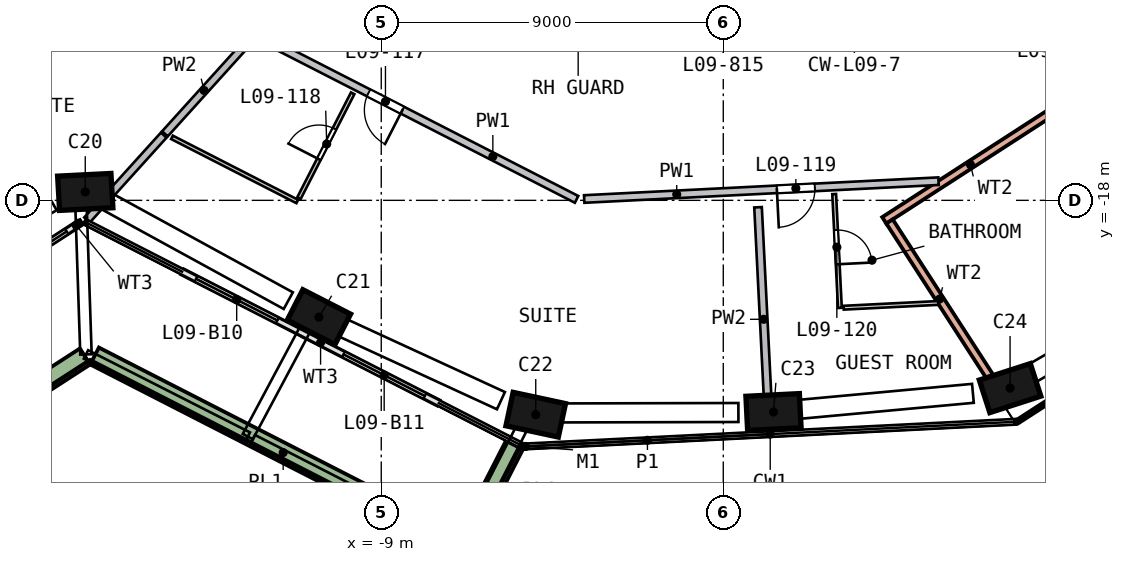
"""IFC4 building model, lengths in metres.
Left out: names, types, materials, properties, quantities, classifications, styles, units other than length and angle.
Written with IfcOpenShell. Run it as: python <this file> out.ifc"""

import sys

from ifc_helpers import new_model, si_unit, direction, frame, frame_2d, origin, origin_2d, place, context, subcontext, project, spatial, rectangle, extrude, element, fill, save


model = new_model("IFC4")
c1 = context("Model", 3, precision=1e-05, world=origin(), true_north=direction((0.0, 1.0)))
c2 = subcontext(c1, "Body", "Model", "MODEL_VIEW")
j1 = project(units=[si_unit("LENGTHUNIT", "METRE"), si_unit("PLANEANGLEUNIT", "RADIAN")], contexts=[c1])
p1 = place(None, origin())
s1 = spatial("IfcSite", under=j1, at=p1, CompositionType="ELEMENT")
p2 = place(p1, origin())
s2 = spatial("IfcBuilding", under=s1, at=p2, CompositionType="ELEMENT")
p3 = place(p2, frame((0.0, 0.0, 46.0)))
s3 = spatial("IfcBuildingStorey", under=s2, at=p3, CompositionType="ELEMENT", Elevation=46.0)
p4 = place(p3, frame((-16.891, -17.683, 0.0), z_axis=(0.084757235, -0.079588184, 0.993217968), x_axis=(-0.995133866, -0.057029138, 0.080350892)))
e1 = element("IfcColumn", 1, at=p4, inside=s3, PredefinedType="COLUMN", context=c2, shape_type="SweptSolid", body=[
    extrude(rectangle(XDim=1.4, YDim=0.9, at=origin_2d()), origin(), (0.0, 0.0, 1.0), 3.212),
])
p5 = place(p3, frame((-10.762, -21.013, 0.0), z_axis=(0.100386469, -0.050345335, 0.993673943), x_axis=(0.884418594, -0.452981845, -0.112299596)))
e2 = element("IfcColumn", 2, at=p5, inside=s3, PredefinedType="COLUMN", context=c2, shape_type="SweptSolid", body=[
    extrude(rectangle(XDim=1.4, YDim=0.9, at=origin_2d()), origin(), (0.0, 0.0, 1.0), 3.21),
])
p6 = place(p3, frame((-5.071, -23.613, 0.0), z_axis=(0.112446021, -0.023188666, 0.993387225), x_axis=(-0.971177217, 0.208887358, 0.114808032)))
e3 = element("IfcColumn", 3, at=p6, inside=s3, PredefinedType="COLUMN", context=c2, shape_type="SweptSolid", body=[
    extrude(rectangle(XDim=1.4, YDim=0.9, at=origin_2d()), origin(), (0.0, 0.0, 1.0), 3.211),
])
p7 = place(p3, frame((1.186, -23.579, 0.0), z_axis=(0.112098353, 0.006616389, 0.993675089), x_axis=(0.992410287, 0.050128839, -0.112289451)))
e4 = element("IfcColumn", 4, at=p7, inside=s3, PredefinedType="COLUMN", context=c2, shape_type="SweptSolid", body=[
    extrude(rectangle(XDim=1.4, YDim=0.9, at=origin_2d()), origin(), (0.0, 0.0, 1.0), 3.21),
])
p8 = place(p3, frame((7.415, -22.985, 0.0), z_axis=(0.109023965, 0.036189266, 0.993380145), x_axis=(-0.945420162, -0.304935678, 0.114869271)))
e5 = element("IfcColumn", 5, at=p8, inside=s3, PredefinedType="COLUMN", context=c2, shape_type="SweptSolid", body=[
    extrude(rectangle(XDim=1.4, YDim=0.9, at=origin_2d()), origin(), (0.0, 0.0, 1.0), 3.211),
])
p9 = place(p3, frame((-18.875, -19.852, 0.0), z_axis=(0.0, 0.0, 1.0), x_axis=(0.839837754, 0.542837496, 0.0)))
e6 = element("IfcWall", 6, at=p9, inside=s3, PredefinedType="SOLIDWALL", context=c2, shape_type="SweptSolid", body=[
    extrude(rectangle(XDim=2.3, YDim=0.15, at=frame_2d((1.15, 0.0))), origin(), (0.0, 0.0, 1.0), 2.425),
])
p10 = place(p9, frame((0.4, 0.0, 0.0)))
e7 = element("IfcOpeningElement", 7, at=p10, cuts=e6, PredefinedType="OPENING", context=c2, shape_type="SweptSolid", body=[
    extrude(rectangle(XDim=1.5, YDim=2.4, at=frame_2d((0.75, 1.2))), frame((0.0, 0.085, 0.0), z_axis=(0.0, -1.0, 0.0), x_axis=(1.0, 0.0, 0.0)), (0.0, 0.0, 1.0), 0.17),
])
p11 = place(p3, frame((-14.228, -19.883, 0.0), z_axis=(0.0, 0.0, 1.0), x_axis=(0.890044707, -0.455873249, 0.0)))
e8 = element("IfcWall", 8, at=p11, inside=s3, PredefinedType="SOLIDWALL", context=c2, shape_type="SweptSolid", body=[
    extrude(rectangle(XDim=3.6, YDim=0.15, at=frame_2d((1.8, 0.0))), origin(), (0.0, 0.0, 1.0), 2.425),
])
p12 = place(p11, frame((0.4, 0.0, 0.0)))
e9 = element("IfcOpeningElement", 9, at=p12, cuts=e8, PredefinedType="OPENING", context=c2, shape_type="SweptSolid", body=[
    extrude(rectangle(XDim=2.4, YDim=2.4, at=frame_2d((1.2, 1.2))), frame((0.0, 0.085, 0.0), z_axis=(0.0, -1.0, 0.0), x_axis=(1.0, 0.0, 0.0)), (0.0, 0.0, 1.0), 0.17),
])
p13 = place(p3, frame((-11.024, -21.524, 0.0), z_axis=(0.0, 0.0, 1.0), x_axis=(0.890058005, -0.455847285, 0.0)))
e10 = element("IfcWall", 10, at=p13, inside=s3, PredefinedType="SOLIDWALL", context=c2, shape_type="SweptSolid", body=[
    extrude(rectangle(XDim=3.961, YDim=0.15, at=frame_2d((1.98, 0.0))), origin(), (0.0, 0.0, 1.0), 2.425),
])
p14 = place(p13, frame((1.16, 0.0, 0.0)))
e11 = element("IfcOpeningElement", 11, at=p14, cuts=e10, PredefinedType="OPENING", context=c2, shape_type="SweptSolid", body=[
    extrude(rectangle(XDim=2.4, YDim=2.4, at=frame_2d((1.2, 1.2))), frame((0.0, 0.085, 0.0), z_axis=(0.0, -1.0, 0.0), x_axis=(1.0, 0.0, 0.0)), (0.0, 0.0, 1.0), 0.17),
])
p15 = place(p3, frame((-23.993, -26.762, 0.0), z_axis=(0.0, 0.0, 1.0), x_axis=(0.839818393, 0.542867449, 0.0)))
e12 = element("IfcWall", 12, at=p15, inside=s3, PredefinedType="SOLIDWALL", context=c2, shape_type="SweptSolid", body=[
    extrude(rectangle(XDim=8.573, YDim=0.5, at=frame_2d((4.286, 0.0))), origin(), (0.0, 0.0, 1.0), 0.7),
])
p16 = place(p3, frame((-16.544, -22.096, 0.0), z_axis=(0.0, 0.0, 1.0), x_axis=(0.890050731, -0.455861489, 0.0)))
e13 = element("IfcWall", 13, at=p16, inside=s3, PredefinedType="SOLIDWALL", context=c2, shape_type="SweptSolid", body=[
    extrude(rectangle(XDim=11.153, YDim=0.5, at=frame_2d((5.576, 0.0))), origin(), (0.0, 0.0, 1.0), 0.7),
])
p17 = place(p3, frame((-6.726, -26.844, 0.0), z_axis=(0.0, 0.0, 1.0), x_axis=(0.45587587, 0.890043365, 0.0)))
e14 = element("IfcWall", 14, at=p17, inside=s3, PredefinedType="SOLIDWALL", context=c2, shape_type="SweptSolid", body=[
    extrude(rectangle(XDim=2.699, YDim=0.5, at=frame_2d((1.35, 0.0))), origin(), (0.0, 0.0, 1.0), 0.7),
])
p18 = place(p3, frame((15.154, -11.469, 0.0), z_axis=(0.0, 0.0, 1.0), x_axis=(-0.839808395, -0.542882915, 0.0)))
e15 = element("IfcWall", 15, at=p18, inside=s3, PredefinedType="SOLIDWALL", context=c2, shape_type="SweptSolid", body=[
    extrude(rectangle(XDim=13.0, YDim=0.2, at=frame_2d((6.5, 0.0))), origin(), (0.0, 0.0, 1.0), 3.19),
])
p19 = place(p18, frame((5.6, 0.0, 0.0)))
e16 = element("IfcOpeningElement", 16, at=p19, cuts=e15, PredefinedType="OPENING", context=c2, shape_type="SweptSolid", body=[
    extrude(rectangle(XDim=1.8, YDim=2.4, at=frame_2d((0.9, 1.2))), frame((0.0, 0.11, 0.0), z_axis=(0.0, -1.0, 0.0), x_axis=(1.0, 0.0, 0.0)), (0.0, 0.0, 1.0), 0.22),
])
p20 = place(p3, frame((7.013, -22.638, 0.0), z_axis=(0.0, 0.0, 1.0), x_axis=(-0.542880541, 0.83980993, 0.0)))
e17 = element("IfcWall", 17, at=p20, inside=s3, PredefinedType="SOLIDWALL", context=c2, shape_type="SweptSolid", body=[
    extrude(rectangle(XDim=4.861, YDim=0.2, at=frame_2d((2.43, 0.0))), origin(), (0.0, 0.0, 1.0), 3.19),
])
p21 = place(p3, frame((7.751, -23.816, 0.0), z_axis=(0.0, 0.0, 1.0), x_axis=(0.839806778, 0.542885417, 0.0)))
e18 = element("IfcWall", 18, at=p21, inside=s3, PredefinedType="SOLIDWALL", context=c2, shape_type="SweptSolid", body=[
    extrude(rectangle(XDim=12.84, YDim=0.1, at=frame_2d((6.42, 0.0))), origin(), (0.0, 0.0, 1.0), 0.7),
])
p22 = place(p3, frame((-30.14, -18.174, 0.0), z_axis=(0.0, 0.0, 1.0), x_axis=(0.839812753, 0.542876173, 0.0)))
e19 = element("IfcWall", 19, at=p22, inside=s3, PredefinedType="SOLIDWALL", context=c2, shape_type="SweptSolid", body=[
    extrude(rectangle(XDim=17.22, YDim=0.2, at=frame_2d((8.61, 0.0))), origin(), (0.0, 0.0, 1.0), 3.19),
])
p23 = place(p22, frame((9.35, 0.0, 0.0)))
e20 = element("IfcOpeningElement", 20, at=p23, cuts=e19, PredefinedType="OPENING", context=c2, shape_type="SweptSolid", body=[
    extrude(rectangle(XDim=1.0, YDim=2.1, at=frame_2d((0.5, 1.05))), frame((0.0, 0.11, 0.0), z_axis=(0.0, -1.0, 0.0), x_axis=(1.0, 0.0, 0.0)), (0.0, 0.0, 1.0), 0.22),
])
p24 = place(p3, frame((-14.316, -10.564, 0.0), z_axis=(0.0, 0.0, 1.0), x_axis=(-0.839811096, -0.542878738, 0.0)))
e21 = element("IfcWall", 21, at=p24, inside=s3, PredefinedType="SOLIDWALL", context=c2, shape_type="SweptSolid", body=[
    extrude(rectangle(XDim=17.42, YDim=0.2, at=frame_2d((8.71, 0.0))), origin(), (0.0, 0.0, 1.0), 3.19),
])
p25 = place(p24, frame((12.7, 0.0, 0.0)))
e22 = element("IfcOpeningElement", 22, at=p25, cuts=e21, PredefinedType="OPENING", context=c2, shape_type="SweptSolid", body=[
    extrude(rectangle(XDim=1.0, YDim=2.1, at=frame_2d((0.5, 1.05))), frame((0.0, 0.11, 0.0), z_axis=(0.0, -1.0, 0.0), x_axis=(1.0, 0.0, 0.0)), (0.0, 0.0, 1.0), 0.22),
])
p26 = place(p3, frame((-3.861, -17.975, 0.0), z_axis=(0.0, 0.0, 1.0), x_axis=(-0.890061259, 0.455840931, 0.0)))
e23 = element("IfcWall", 23, at=p26, inside=s3, PredefinedType="SOLIDWALL", context=c2, shape_type="SweptSolid", body=[
    extrude(rectangle(XDim=9.316, YDim=0.2, at=frame_2d((4.658, 0.0))), origin(), (0.0, 0.0, 1.0), 3.19),
])
p27 = place(p26, frame((5.15, 0.0, 0.0)))
e24 = element("IfcOpeningElement", 24, at=p27, cuts=e23, PredefinedType="OPENING", context=c2, shape_type="SweptSolid", body=[
    extrude(rectangle(XDim=1.0, YDim=2.1, at=frame_2d((0.5, 1.05))), frame((0.0, 0.11, 0.0), z_axis=(0.0, -1.0, 0.0), x_axis=(1.0, 0.0, 0.0)), (0.0, 0.0, 1.0), 0.22),
])
p28 = place(p3, frame((5.665, -17.496, 0.0), z_axis=(0.0, 0.0, 1.0), x_axis=(-0.998737492, -0.050233674, 0.0)))
e25 = element("IfcWall", 25, at=p28, inside=s3, PredefinedType="SOLIDWALL", context=c2, shape_type="SweptSolid", body=[
    extrude(rectangle(XDim=9.336, YDim=0.2, at=frame_2d((4.668, 0.0))), origin(), (0.0, 0.0, 1.0), 3.19),
])
p29 = place(p28, frame((3.26, 0.0, 0.0)))
e26 = element("IfcOpeningElement", 26, at=p29, cuts=e25, PredefinedType="OPENING", context=c2, shape_type="SweptSolid", body=[
    extrude(rectangle(XDim=1.0, YDim=2.1, at=frame_2d((0.5, 1.05))), frame((0.0, 0.11, 0.0), z_axis=(0.0, -1.0, 0.0), x_axis=(1.0, 0.0, 0.0)), (0.0, 0.0, 1.0), 0.22),
])
p30 = place(p3, frame((-14.723, -16.283, 0.0), z_axis=(0.0, 0.0, 1.0), x_axis=(-0.670660655, -0.741764306, 0.0)))
e27 = element("IfcWall", 27, at=p30, inside=s3, PredefinedType="SOLIDWALL", context=c2, shape_type="SweptSolid", body=[
    extrude(rectangle(XDim=3.011, YDim=0.2, at=frame_2d((1.506, 0.0))), origin(), (0.0, 0.0, 1.0), 3.19),
])
p31 = place(p3, frame((-12.63, -13.969, 0.0), z_axis=(0.0, 0.0, 1.0), x_axis=(-0.670678334, -0.741748321, 0.0)))
e28 = element("IfcWall", 28, at=p31, inside=s3, PredefinedType="SOLIDWALL", context=c2, shape_type="SweptSolid", body=[
    extrude(rectangle(XDim=3.074, YDim=0.2, at=frame_2d((1.537, 0.0))), origin(), (0.0, 0.0, 1.0), 3.19),
])
p32 = place(p3, frame((0.915, -18.183, 0.0), z_axis=(0.0, 0.0, 1.0), x_axis=(0.050211978, -0.998738583, 0.0)))
e29 = element("IfcWall", 29, at=p32, inside=s3, PredefinedType="SOLIDWALL", context=c2, shape_type="SweptSolid", body=[
    extrude(rectangle(XDim=5.903, YDim=0.2, at=frame_2d((2.951, 0.0))), origin(), (0.0, 0.0, 1.0), 3.19),
])
p33 = place(p3, frame((-11.21, -18.031, 0.0), z_axis=(0.0, 0.0, 1.0), x_axis=(-0.890047931, 0.455866955, 0.0)))
e30 = element("IfcWall", 30, at=p33, inside=s3, PredefinedType="PARTITIONING", context=c2, shape_type="SweptSolid", body=[
    extrude(rectangle(XDim=3.704, YDim=0.1, at=frame_2d((1.852, 0.0))), origin(), (0.0, 0.0, 1.0), 3.19),
])
p34 = place(p3, frame((-11.165, -17.941, 0.0), z_axis=(0.0, 0.0, 1.0), x_axis=(0.455856087, 0.890053497, 0.0)))
e31 = element("IfcWall", 31, at=p34, inside=s3, PredefinedType="PARTITIONING", context=c2, shape_type="SweptSolid", body=[
    extrude(rectangle(XDim=3.1, YDim=0.1, at=frame_2d((1.55, 0.0))), origin(), (0.0, 0.0, 1.0), 3.19),
])
p35 = place(p34, frame((1.15, 0.0, 0.0)))
e32 = element("IfcOpeningElement", 32, at=p35, cuts=e31, PredefinedType="OPENING", context=c2, shape_type="SweptSolid", body=[
    extrude(rectangle(XDim=0.9, YDim=2.1, at=frame_2d((0.45, 1.05))), frame((0.0, 0.06, 0.0), z_axis=(0.0, -1.0, 0.0), x_axis=(1.0, 0.0, 0.0)), (0.0, 0.0, 1.0), 0.12),
])
p36 = place(p3, frame((2.918, -17.834, 0.0), z_axis=(0.0, 0.0, 1.0), x_axis=(0.050213629, -0.9987385, 0.0)))
e33 = element("IfcWall", 33, at=p36, inside=s3, PredefinedType="PARTITIONING", context=c2, shape_type="SweptSolid", body=[
    extrude(rectangle(XDim=3.0, YDim=0.1, at=frame_2d((1.5, 0.0))), origin(), (0.0, 0.0, 1.0), 3.19),
])
p37 = place(p36, frame((0.95, 0.0, 0.0)))
e34 = element("IfcOpeningElement", 34, at=p37, cuts=e33, PredefinedType="OPENING", context=c2, shape_type="SweptSolid", body=[
    extrude(rectangle(XDim=0.9, YDim=2.1, at=frame_2d((0.45, 1.05))), frame((0.0, 0.06, 0.0), z_axis=(0.0, -1.0, 0.0), x_axis=(1.0, 0.0, 0.0)), (0.0, 0.0, 1.0), 0.12),
])
p38 = place(p3, frame((5.662, -20.7, 0.0), z_axis=(0.0, 0.0, 1.0), x_axis=(-0.998735946, -0.050264396, 0.0)))
e35 = element("IfcWall", 35, at=p38, inside=s3, PredefinedType="PARTITIONING", context=c2, shape_type="SweptSolid", body=[
    extrude(rectangle(XDim=2.497, YDim=0.1, at=frame_2d((1.248, 0.0))), origin(), (0.0, 0.0, 1.0), 3.19),
])
p39 = place(p10, origin())
e36 = element("IfcDoor", 36, at=p39, inside=s3, OperationType="SLIDING_TO_RIGHT", PredefinedType="DOOR", context=c2, shape_type="SweptSolid", body=[
    extrude(rectangle(XDim=1.5, YDim=2.4, at=frame_2d((0.75, 1.2))), frame((0.0, 0.025, 0.0), z_axis=(0.0, -1.0, 0.0), x_axis=(1.0, 0.0, 0.0)), (0.0, 0.0, 1.0), 0.05),
])
fill(e7, e36)
p40 = place(p12, origin())
e37 = element("IfcDoor", 37, at=p40, inside=s3, OperationType="SLIDING_TO_RIGHT", PredefinedType="DOOR", context=c2, shape_type="SweptSolid", body=[
    extrude(rectangle(XDim=2.4, YDim=2.4, at=frame_2d((1.2, 1.2))), frame((0.0, 0.025, 0.0), z_axis=(0.0, -1.0, 0.0), x_axis=(1.0, 0.0, 0.0)), (0.0, 0.0, 1.0), 0.05),
])
fill(e9, e37)
p41 = place(p14, origin())
e38 = element("IfcDoor", 38, at=p41, inside=s3, OperationType="SLIDING_TO_LEFT", PredefinedType="DOOR", context=c2, shape_type="SweptSolid", body=[
    extrude(rectangle(XDim=2.4, YDim=2.4, at=frame_2d((1.2, 1.2))), frame((0.0, 0.025, 0.0), z_axis=(0.0, -1.0, 0.0), x_axis=(1.0, 0.0, 0.0)), (0.0, 0.0, 1.0), 0.05),
])
fill(e11, e38)
p42 = place(p27, origin())
e39 = element("IfcDoor", 39, at=p42, inside=s3, OperationType="SINGLE_SWING_LEFT", PredefinedType="DOOR", context=c2, shape_type="SweptSolid", body=[
    extrude(rectangle(XDim=1.0, YDim=2.1, at=frame_2d((0.5, 1.05))), frame((0.0, 0.025, 0.0), z_axis=(0.0, -1.0, 0.0), x_axis=(1.0, 0.0, 0.0)), (0.0, 0.0, 1.0), 0.05),
])
fill(e24, e39)
p43 = place(p35, origin())
e40 = element("IfcDoor", 40, at=p43, inside=s3, OperationType="SINGLE_SWING_LEFT", PredefinedType="DOOR", context=c2, shape_type="SweptSolid", body=[
    extrude(rectangle(XDim=0.9, YDim=2.1, at=frame_2d((0.45, 1.05))), frame((0.0, 0.025, 0.0), z_axis=(0.0, -1.0, 0.0), x_axis=(1.0, 0.0, 0.0)), (0.0, 0.0, 1.0), 0.05),
])
fill(e32, e40)
p44 = place(p29, origin())
e41 = element("IfcDoor", 41, at=p44, inside=s3, OperationType="SINGLE_SWING_RIGHT", PredefinedType="DOOR", context=c2, shape_type="SweptSolid", body=[
    extrude(rectangle(XDim=1.0, YDim=2.1, at=frame_2d((0.5, 1.05))), frame((0.0, 0.025, 0.0), z_axis=(0.0, -1.0, 0.0), x_axis=(1.0, 0.0, 0.0)), (0.0, 0.0, 1.0), 0.05),
])
fill(e26, e41)
p45 = place(p37, origin())
e42 = element("IfcDoor", 42, at=p45, inside=s3, OperationType="SINGLE_SWING_RIGHT", PredefinedType="DOOR", context=c2, shape_type="SweptSolid", body=[
    extrude(rectangle(XDim=0.9, YDim=2.1, at=frame_2d((0.45, 1.05))), frame((0.0, 0.025, 0.0), z_axis=(0.0, -1.0, 0.0), x_axis=(1.0, 0.0, 0.0)), (0.0, 0.0, 1.0), 0.05),
])
fill(e34, e42)
save(model, sys.argv[1])
